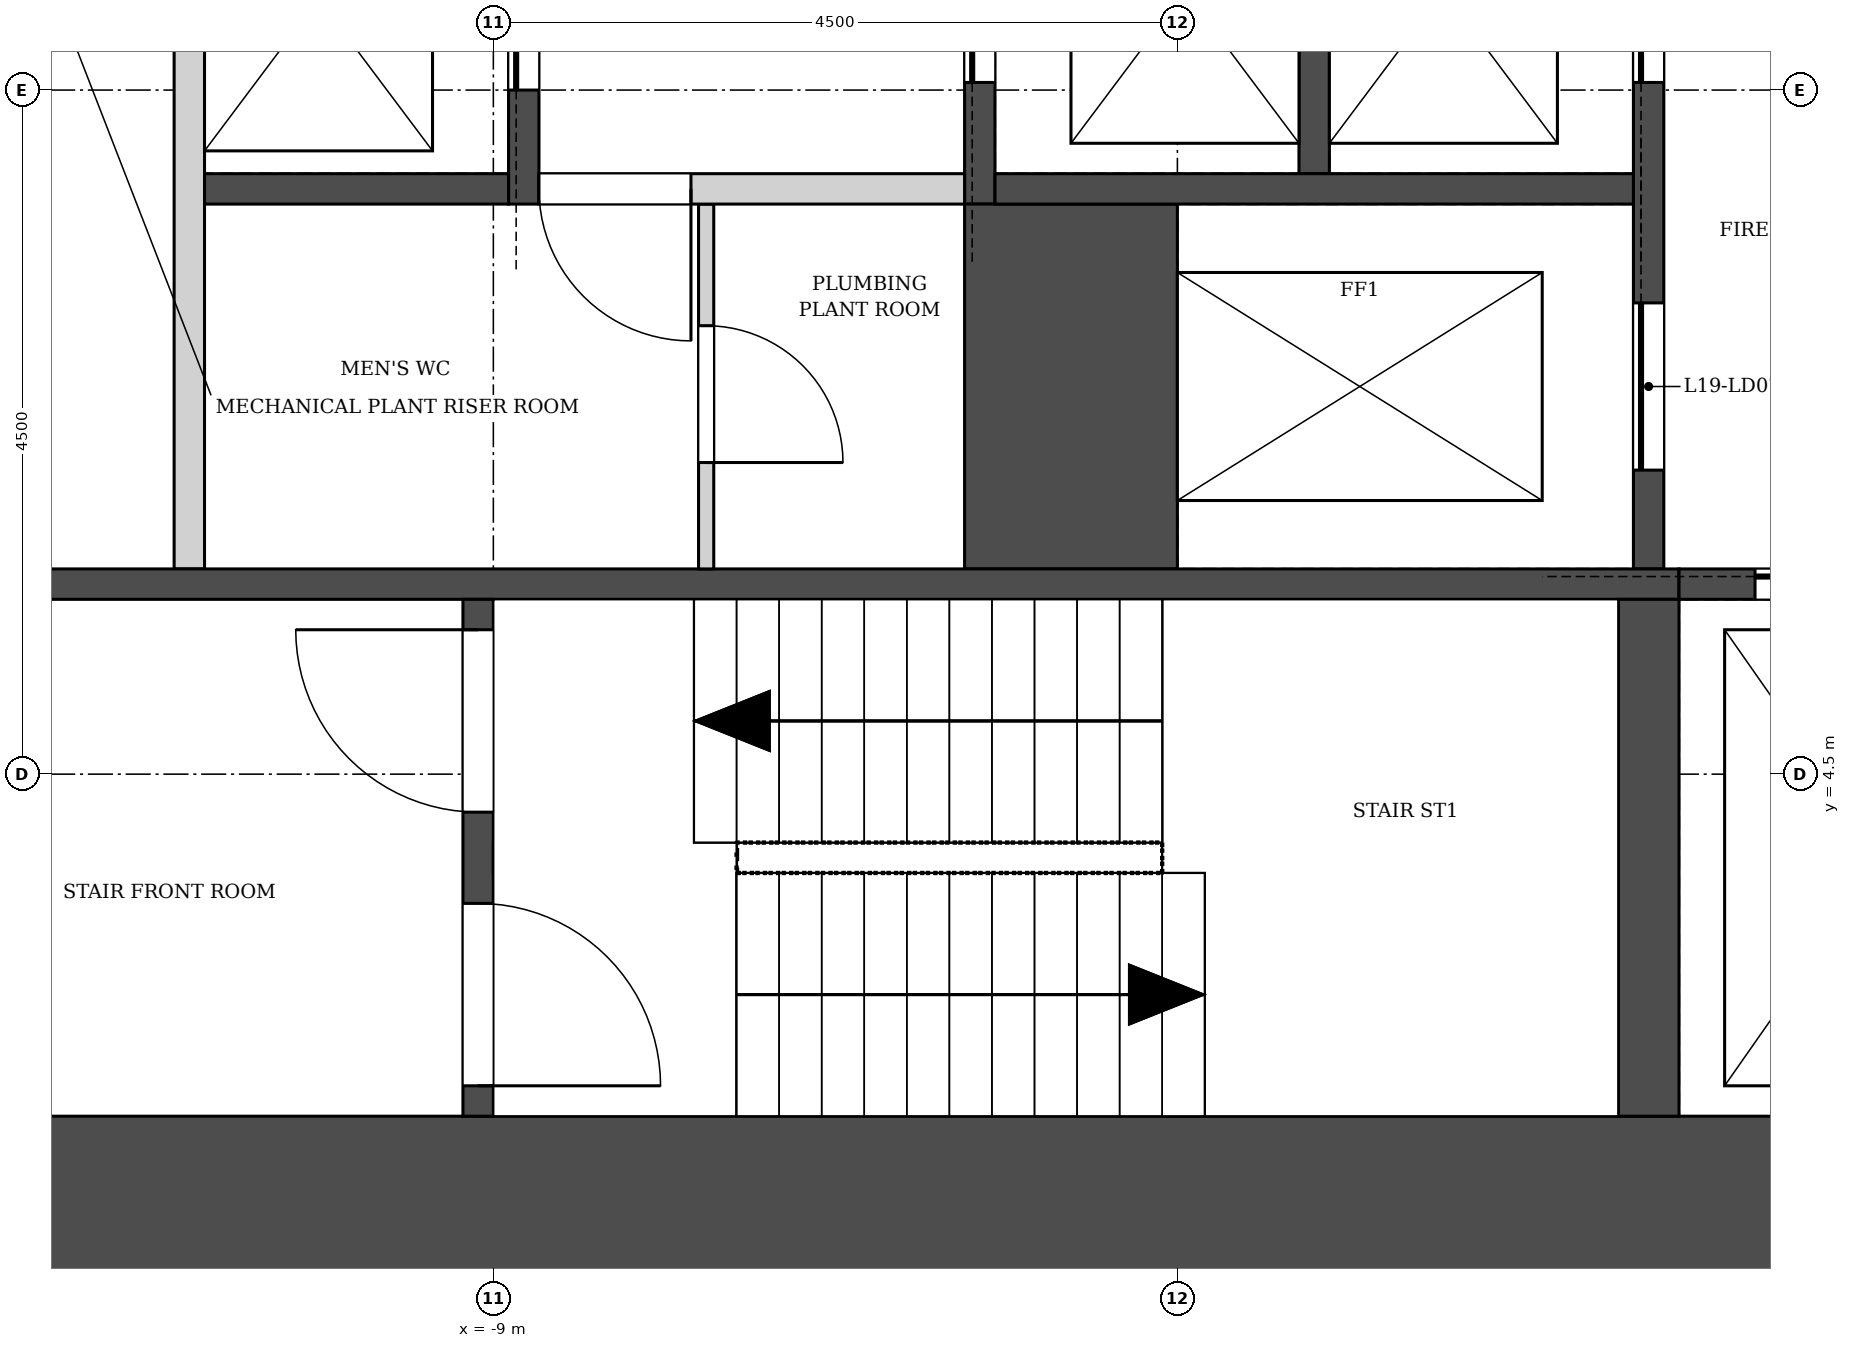
"""IFC4 building model, lengths in metres.
Left out: names, types, materials, properties, quantities, classifications, styles, units other than length and angle.
Written with IfcOpenShell. Run it as: python <this file> out.ifc"""

import sys

from ifc_helpers import new_model, si_unit, direction, frame, frame_2d, origin, place, context, subcontext, project, spatial, rectangle, extrude, element, fill, save


model = new_model("IFC4")
c1 = context("Model", 3, precision=1e-05, world=origin(), true_north=direction((0.0, 1.0)))
c2 = subcontext(c1, "Body", "Model", "MODEL_VIEW")
j1 = project(units=[si_unit("LENGTHUNIT", "METRE"), si_unit("PLANEANGLEUNIT", "RADIAN")], contexts=[c1])
p1 = place(None, origin())
s1 = spatial("IfcSite", under=j1, at=p1, CompositionType="ELEMENT")
p2 = place(p1, origin())
s2 = spatial("IfcBuilding", under=s1, at=p2, CompositionType="ELEMENT")
p3 = place(p2, frame((0.0, 0.0, 88.9)))
s3 = spatial("IfcBuildingStorey", under=s2, at=p3, CompositionType="ELEMENT", Elevation=88.9)
p4 = place(p3, frame((-14.0, 1.55, 0.0), z_axis=(0.0, 0.0, 1.0), x_axis=(1.0, 0.0, 0.0)))
e1 = element("IfcWall", 1, at=p4, inside=s3, PredefinedType="SHEAR", context=c2, shape_type="SweptSolid", body=[
    extrude(rectangle(XDim=28.0, YDim=1.4, at=frame_2d((14.0, 0.0))), origin(), (0.0, 0.0, 1.0), 7.2),
])
p5 = place(p3, frame((-4.353, 53.627, 0.0), z_axis=(0.0, 0.0, 1.0), x_axis=(-0.500000400847, -0.866025172355, 0.0)))
e2 = element("IfcWall", 2, at=p5, inside=s3, PredefinedType="SOLIDWALL", context=c2, shape_type="SweptSolid", body=[
    extrude(rectangle(XDim=53.021, YDim=0.34, at=frame_2d((26.51, 0.0))), origin(), (0.0, 0.0, 1.0), 6.8),
])
p6 = place(p3, frame((-11.0, 5.85, 0.0), z_axis=(0.0, 0.0, 1.0), x_axis=(0.0, 1.0, 0.0)))
e3 = element("IfcWall", 3, at=p6, inside=s3, PredefinedType="SOLIDWALL", context=c2, shape_type="SweptSolid", body=[
    extrude(rectangle(XDim=7.4, YDim=0.2, at=frame_2d((3.7, 0.0))), origin(), (0.0, 0.0, 1.0), 6.8),
])
p7 = place(p3, frame((-8.8, 8.25, -0.3), z_axis=(0.0, 0.0, 1.0), x_axis=(0.0, 1.0, 0.0)))
e4 = element("IfcWall", 4, at=p7, inside=s3, PredefinedType="SOLIDWALL", context=c2, shape_type="SweptSolid", body=[
    extrude(rectangle(XDim=5.2, YDim=0.2, at=frame_2d((2.6, 0.0))), origin(), (0.0, 0.0, 1.0), 7.1),
])
p8 = place(p7, frame((0.75, 0.0, 0.3)))
e5 = element("IfcOpeningElement", 5, at=p8, cuts=e4, PredefinedType="OPENING", context=c2, shape_type="SweptSolid", body=[
    extrude(rectangle(XDim=1.2, YDim=2.1, at=frame_2d((0.6, 1.05))), frame((0.0, 0.11, 0.0), z_axis=(0.0, -1.0, 0.0), x_axis=(1.0, 0.0, 0.0)), (0.0, 0.0, 1.0), 0.22),
])
p9 = place(p7, frame((3.25, 0.0, 0.3)))
e6 = element("IfcOpeningElement", 6, at=p9, cuts=e4, PredefinedType="OPENING", context=c2, shape_type="SweptSolid", body=[
    extrude(rectangle(XDim=1.2, YDim=2.1, at=frame_2d((0.6, 1.05))), frame((0.0, 0.11, 0.0), z_axis=(0.0, -1.0, 0.0), x_axis=(1.0, 0.0, 0.0)), (0.0, 0.0, 1.0), 0.22),
])
p10 = place(p3, frame((-5.8, 8.25, -0.3), z_axis=(0.0, 0.0, 1.0), x_axis=(0.0, 1.0, 0.0)))
e7 = element("IfcWall", 7, at=p10, inside=s3, PredefinedType="SOLIDWALL", context=c2, shape_type="SweptSolid", body=[
    extrude(rectangle(XDim=8.0, YDim=0.2, at=frame_2d((4.0, 0.0))), origin(), (0.0, 0.0, 1.0), 7.1),
])
p11 = place(p10, frame((0.8, 0.0, 0.3)))
e8 = element("IfcOpeningElement", 8, at=p11, cuts=e7, PredefinedType="OPENING", context=c2, shape_type="SweptSolid", body=[
    extrude(rectangle(XDim=1.2, YDim=2.1, at=frame_2d((0.6, 1.05))), frame((0.0, 0.11, 0.0), z_axis=(0.0, -1.0, 0.0), x_axis=(1.0, 0.0, 0.0)), (0.0, 0.0, 1.0), 0.22),
])
p12 = place(p10, frame((3.4, 0.0, 0.3)))
e9 = element("IfcOpeningElement", 9, at=p12, cuts=e7, PredefinedType="OPENING", context=c2, shape_type="SweptSolid", body=[
    extrude(rectangle(XDim=1.2, YDim=2.1, at=frame_2d((0.6, 1.05))), frame((0.0, 0.11, 0.0), z_axis=(0.0, -1.0, 0.0), x_axis=(1.0, 0.0, 0.0)), (0.0, 0.0, 1.0), 0.22),
])
p13 = place(p10, frame((6.0, 0.0, 0.3)))
e10 = element("IfcOpeningElement", 10, at=p13, cuts=e7, PredefinedType="OPENING", context=c2, shape_type="SweptSolid", body=[
    extrude(rectangle(XDim=1.2, YDim=2.1, at=frame_2d((0.6, 1.05))), frame((0.0, 0.11, 0.0), z_axis=(0.0, -1.0, 0.0), x_axis=(1.0, 0.0, 0.0)), (0.0, 0.0, 1.0), 0.22),
])
p14 = place(p3, frame((-3.6, 8.45, -0.3), z_axis=(0.0, 0.0, 1.0), x_axis=(0.0, 1.0, 0.0)))
e11 = element("IfcWall", 11, at=p14, inside=s3, PredefinedType="SOLIDWALL", context=c2, shape_type="SweptSolid", body=[
    extrude(rectangle(XDim=7.8, YDim=0.2, at=frame_2d((3.9, 0.0))), origin(), (0.0, 0.0, 1.0), 7.1),
])
p15 = place(p3, frame((-1.4, 5.85, -0.3), z_axis=(0.0, 0.0, 1.0), x_axis=(0.0, 1.0, 0.0)))
e12 = element("IfcWall", 12, at=p15, inside=s3, PredefinedType="SOLIDWALL", context=c2, shape_type="SweptSolid", body=[
    extrude(rectangle(XDim=11.75, YDim=0.2, at=frame_2d((5.875, 0.0))), origin(), (0.0, 0.0, 1.0), 7.1),
])
p16 = place(p15, frame((3.2, 0.0, 0.3)))
e13 = element("IfcOpeningElement", 13, at=p16, cuts=e12, PredefinedType="OPENING", context=c2, shape_type="SweptSolid", body=[
    extrude(rectangle(XDim=1.2, YDim=2.1, at=frame_2d((0.6, 1.05))), frame((0.0, 0.11, 0.0), z_axis=(0.0, -1.0, 0.0), x_axis=(1.0, 0.0, 0.0)), (0.0, 0.0, 1.0), 0.22),
])
p17 = place(p15, frame((0.65, 0.0, 0.3)))
e14 = element("IfcOpeningElement", 14, at=p17, cuts=e12, PredefinedType="OPENING", context=c2, shape_type="SweptSolid", body=[
    extrude(rectangle(XDim=1.1, YDim=2.1, at=frame_2d((0.55, 1.05))), frame((0.0, 0.11, 0.0), z_axis=(0.0, -1.0, 0.0), x_axis=(1.0, 0.0, 0.0)), (0.0, 0.0, 1.0), 0.22),
])
p18 = place(p3, frame((-5.2, 5.85, -0.3), z_axis=(0.0, 0.0, 1.0), x_axis=(0.0, 1.0, 0.0)))
e15 = element("IfcWall", 15, at=p18, inside=s3, PredefinedType="SOLIDWALL", context=c2, shape_type="SweptSolid", body=[
    extrude(rectangle(XDim=2.4, YDim=1.4, at=frame_2d((1.2, 0.0))), origin(), (0.0, 0.0, 1.0), 7.1),
])
p19 = place(p3, frame((-10.9, 8.35, -0.3), z_axis=(0.0, 0.0, 1.0), x_axis=(1.0, 0.0, 0.0)))
e16 = element("IfcWall", 16, at=p19, inside=s3, PredefinedType="SOLIDWALL", context=c2, shape_type="SweptSolid", body=[
    extrude(rectangle(XDim=2.0, YDim=0.2, at=frame_2d((1.0, 0.0))), origin(), (0.0, 0.0, 1.0), 7.1),
])
p20 = place(p3, frame((-5.7, 8.35, -0.3), z_axis=(0.0, 0.0, 1.0), x_axis=(1.0, 0.0, 0.0)))
e17 = element("IfcWall", 17, at=p20, inside=s3, PredefinedType="SOLIDWALL", context=c2, shape_type="SweptSolid", body=[
    extrude(rectangle(XDim=4.2, YDim=0.2, at=frame_2d((2.1, 0.0))), origin(), (0.0, 0.0, 1.0), 7.1),
])
p21 = place(p3, frame((-12.6, 5.75, -0.3), z_axis=(0.0, 0.0, 1.0), x_axis=(1.0, 0.0, 0.0)))
e18 = element("IfcWall", 18, at=p21, inside=s3, PredefinedType="SOLIDWALL", context=c2, shape_type="SweptSolid", body=[
    extrude(rectangle(XDim=11.4, YDim=0.2, at=frame_2d((5.7, 0.0))), origin(), (0.0, 0.0, 1.0), 7.1),
])
p22 = place(p3, frame((-1.2, 5.75, -0.3), z_axis=(0.0, 0.0, 1.0), x_axis=(1.0, 0.0, 0.0)))
e19 = element("IfcWall", 19, at=p22, inside=s3, PredefinedType="SOLIDWALL", context=c2, shape_type="SweptSolid", body=[
    extrude(rectangle(XDim=2.4, YDim=0.2, at=frame_2d((1.2, 0.0))), origin(), (0.0, 0.0, 1.0), 7.1),
])
p23 = place(p22, frame((0.5, 0.0, 0.3)))
e20 = element("IfcOpeningElement", 20, at=p23, cuts=e19, PredefinedType="OPENING", context=c2, shape_type="SweptSolid", body=[
    extrude(rectangle(XDim=1.4, YDim=2.1, at=frame_2d((0.7, 1.05))), frame((0.0, 0.11, 0.0), z_axis=(0.0, -1.0, 0.0), x_axis=(1.0, 0.0, 0.0)), (0.0, 0.0, 1.0), 0.22),
])
p24 = place(p3, frame((-9.1, 2.25, -0.3), z_axis=(0.0, 0.0, 1.0), x_axis=(0.0, 1.0, 0.0)))
e21 = element("IfcWall", 21, at=p24, inside=s3, PredefinedType="SOLIDWALL", context=c2, shape_type="SweptSolid", body=[
    extrude(rectangle(XDim=3.4, YDim=0.2, at=frame_2d((1.7, 0.0))), origin(), (0.0, 0.0, 1.0), 7.1),
])
p25 = place(p24, frame((0.2, 0.0, 0.3)))
e22 = element("IfcOpeningElement", 22, at=p25, cuts=e21, PredefinedType="OPENING", context=c2, shape_type="SweptSolid", body=[
    extrude(rectangle(XDim=1.2, YDim=2.1, at=frame_2d((0.6, 1.05))), frame((0.0, 0.11, 0.0), z_axis=(0.0, -1.0, 0.0), x_axis=(1.0, 0.0, 0.0)), (0.0, 0.0, 1.0), 0.22),
])
p26 = place(p24, frame((2.0, 0.0, 0.3)))
e23 = element("IfcOpeningElement", 23, at=p26, cuts=e21, PredefinedType="OPENING", context=c2, shape_type="SweptSolid", body=[
    extrude(rectangle(XDim=1.2, YDim=2.1, at=frame_2d((0.6, 1.05))), frame((0.0, 0.11, 0.0), z_axis=(0.0, -1.0, 0.0), x_axis=(1.0, 0.0, 0.0)), (0.0, 0.0, 1.0), 0.22),
])
p27 = place(p3, frame((-1.4, 2.25, -0.3), z_axis=(0.0, 0.0, 1.0), x_axis=(0.0, 1.0, 0.0)))
e24 = element("IfcWall", 24, at=p27, inside=s3, PredefinedType="SOLIDWALL", context=c2, shape_type="SweptSolid", body=[
    extrude(rectangle(XDim=3.4, YDim=0.4, at=frame_2d((1.7, 0.0))), origin(), (0.0, 0.0, 1.0), 7.1),
])
p28 = place(p3, frame((-7.6, 5.85, 0.0), z_axis=(0.0, 0.0, 1.0), x_axis=(0.0, 1.0, 0.0)))
e25 = element("IfcWall", 25, at=p28, inside=s3, PredefinedType="PARTITIONING", context=c2, shape_type="SweptSolid", body=[
    extrude(rectangle(XDim=2.4, YDim=0.1, at=frame_2d((1.2, 0.0))), origin(), (0.0, 0.0, 1.0), 6.8),
])
p29 = place(p28, frame((0.7, 0.0, 0.0)))
e26 = element("IfcOpeningElement", 26, at=p29, cuts=e25, PredefinedType="OPENING", context=c2, shape_type="SweptSolid", body=[
    extrude(rectangle(XDim=0.9, YDim=2.1, at=frame_2d((0.45, 1.05))), frame((0.0, 0.06, 0.0), z_axis=(0.0, -1.0, 0.0), x_axis=(1.0, 0.0, 0.0)), (0.0, 0.0, 1.0), 0.12),
])
p30 = place(p3, frame((-8.7, 8.35, 0.0), z_axis=(0.0, 0.0, 1.0), x_axis=(1.0, 0.0, 0.0)))
e27 = element("IfcWall", 27, at=p30, inside=s3, PredefinedType="SOLIDWALL", context=c2, shape_type="SweptSolid", body=[
    extrude(rectangle(XDim=2.8, YDim=0.2, at=frame_2d((1.4, 0.0))), origin(), (0.0, 0.0, 1.0), 6.8),
])
p31 = place(p30, origin())
e28 = element("IfcOpeningElement", 28, at=p31, cuts=e27, PredefinedType="OPENING", context=c2, shape_type="SweptSolid", body=[
    extrude(rectangle(XDim=1.0, YDim=2.1, at=frame_2d((0.5, 1.05))), frame((0.0, 0.11, 0.0), z_axis=(0.0, -1.0, 0.0), x_axis=(1.0, 0.0, 0.0)), (0.0, 0.0, 1.0), 0.22),
])
p32 = place(p3, frame((-9.0, 3.95, 0.0), z_axis=(0.0, 0.0, 1.0), x_axis=(1.0, 0.0, 0.0)))
e29 = element("IfcWall", 29, at=p32, inside=s3, PredefinedType="SOLIDWALL", context=c2, shape_type="SweptSolid", body=[
    extrude(rectangle(XDim=1.6, YDim=0.2, at=frame_2d((0.8, 0.0))), origin(), (0.0, 0.0, 1.0), 6.8),
])
p33 = place(p8, origin())
e30 = element("IfcDoor", 30, at=p33, inside=s3, OperationType="SLIDING_TO_LEFT", PredefinedType="DOOR", context=c2, shape_type="SweptSolid", body=[
    extrude(rectangle(XDim=1.2, YDim=2.1, at=frame_2d((0.6, 1.05))), frame((0.0, 0.025, 0.0), z_axis=(0.0, -1.0, 0.0), x_axis=(1.0, 0.0, 0.0)), (0.0, 0.0, 1.0), 0.05),
])
fill(e5, e30)
p34 = place(p11, origin())
e31 = element("IfcDoor", 31, at=p34, inside=s3, OperationType="SLIDING_TO_LEFT", PredefinedType="DOOR", context=c2, shape_type="SweptSolid", body=[
    extrude(rectangle(XDim=1.2, YDim=2.1, at=frame_2d((0.6, 1.05))), frame((0.0, 0.025, 0.0), z_axis=(0.0, -1.0, 0.0), x_axis=(1.0, 0.0, 0.0)), (0.0, 0.0, 1.0), 0.05),
])
fill(e8, e31)
p35 = place(p16, origin())
e32 = element("IfcDoor", 32, at=p35, inside=s3, OperationType="SLIDING_TO_LEFT", PredefinedType="DOOR", context=c2, shape_type="SweptSolid", body=[
    extrude(rectangle(XDim=1.2, YDim=2.1, at=frame_2d((0.6, 1.05))), frame((0.0, 0.025, 0.0), z_axis=(0.0, -1.0, 0.0), x_axis=(1.0, 0.0, 0.0)), (0.0, 0.0, 1.0), 0.05),
])
fill(e13, e32)
p36 = place(p17, origin())
e33 = element("IfcDoor", 33, at=p36, inside=s3, OperationType="SLIDING_TO_RIGHT", PredefinedType="DOOR", context=c2, shape_type="SweptSolid", body=[
    extrude(rectangle(XDim=1.1, YDim=2.1, at=frame_2d((0.55, 1.05))), frame((0.0, 0.025, 0.0), z_axis=(0.0, -1.0, 0.0), x_axis=(1.0, 0.0, 0.0)), (0.0, 0.0, 1.0), 0.05),
])
fill(e14, e33)
p37 = place(p23, origin())
e34 = element("IfcDoor", 34, at=p37, inside=s3, OperationType="SLIDING_TO_LEFT", PredefinedType="DOOR", context=c2, shape_type="SweptSolid", body=[
    extrude(rectangle(XDim=1.4, YDim=2.1, at=frame_2d((0.7, 1.05))), frame((0.0, 0.025, 0.0), z_axis=(0.0, -1.0, 0.0), x_axis=(1.0, 0.0, 0.0)), (0.0, 0.0, 1.0), 0.05),
])
fill(e20, e34)
p38 = place(p31, frame((1.0, 0.0, 0.0), z_axis=(0.0, 0.0, 1.0), x_axis=(-1.0, 0.0, 0.0)))
e35 = element("IfcDoor", 35, at=p38, inside=s3, OperationType="SINGLE_SWING_LEFT", PredefinedType="DOOR", context=c2, shape_type="SweptSolid", body=[
    extrude(rectangle(XDim=1.0, YDim=2.1, at=frame_2d((0.5, 1.05))), frame((0.0, 0.025, 0.0), z_axis=(0.0, -1.0, 0.0), x_axis=(1.0, 0.0, 0.0)), (0.0, 0.0, 1.0), 0.05),
])
fill(e28, e35)
p39 = place(p29, frame((0.9, 0.0, 0.0), z_axis=(0.0, 0.0, 1.0), x_axis=(-1.0, 0.0, 0.0)))
e36 = element("IfcDoor", 36, at=p39, inside=s3, OperationType="SINGLE_SWING_RIGHT", PredefinedType="DOOR", context=c2, shape_type="SweptSolid", body=[
    extrude(rectangle(XDim=0.9, YDim=2.1, at=frame_2d((0.45, 1.05))), frame((0.0, 0.025, 0.0), z_axis=(0.0, -1.0, 0.0), x_axis=(1.0, 0.0, 0.0)), (0.0, 0.0, 1.0), 0.05),
])
fill(e26, e36)
p40 = place(p25, frame((1.2, 0.0, 0.0), z_axis=(0.0, 0.0, 1.0), x_axis=(-1.0, 0.0, 0.0)))
e37 = element("IfcDoor", 37, at=p40, inside=s3, OperationType="SINGLE_SWING_RIGHT", PredefinedType="DOOR", context=c2, shape_type="SweptSolid", body=[
    extrude(rectangle(XDim=1.2, YDim=2.1, at=frame_2d((0.6, 1.05))), frame((0.0, 0.025, 0.0), z_axis=(0.0, -1.0, 0.0), x_axis=(1.0, 0.0, 0.0)), (0.0, 0.0, 1.0), 0.05),
])
fill(e22, e37)
p41 = place(p26, origin())
e38 = element("IfcDoor", 38, at=p41, inside=s3, OperationType="SINGLE_SWING_RIGHT", PredefinedType="DOOR", context=c2, shape_type="SweptSolid", body=[
    extrude(rectangle(XDim=1.2, YDim=2.1, at=frame_2d((0.6, 1.05))), frame((0.0, 0.025, 0.0), z_axis=(0.0, -1.0, 0.0), x_axis=(1.0, 0.0, 0.0)), (0.0, 0.0, 1.0), 0.05),
])
fill(e23, e38)
save(model, sys.argv[1])
